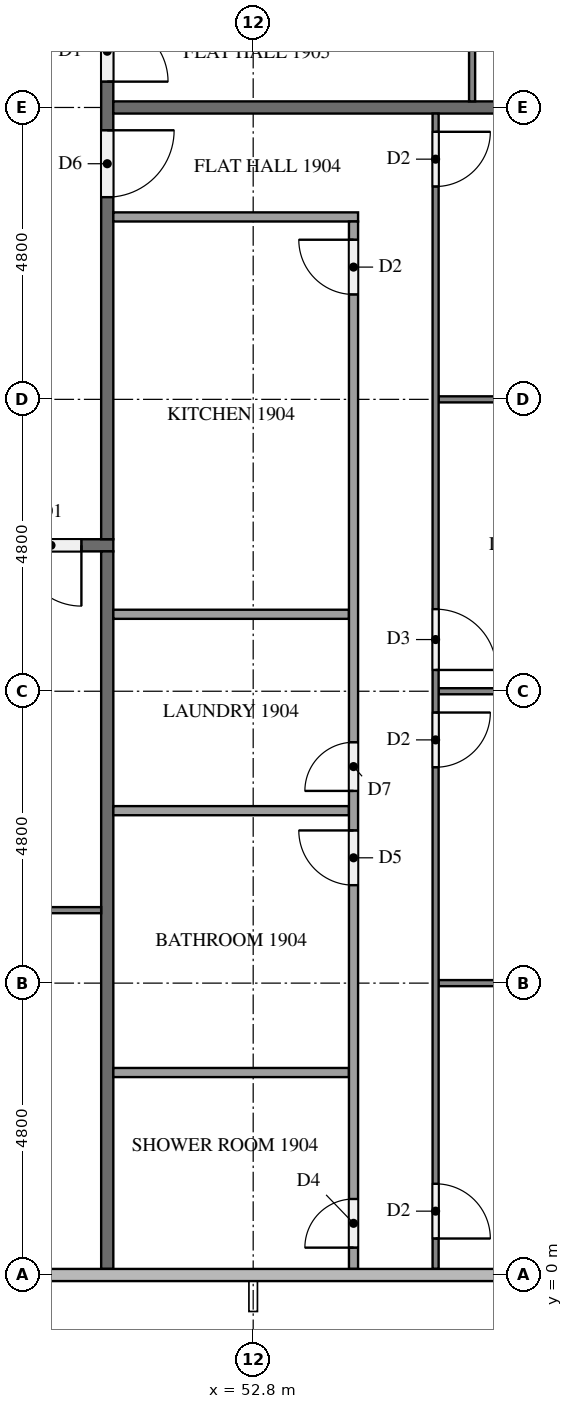
"""IFC4 building model, lengths in metres.
Left out: names, types, materials, properties, quantities, classifications, styles, units other than length and angle.
Written with IfcOpenShell. Run it as: python <this file> out.ifc"""

import sys

from ifc_helpers import new_model, si_unit, direction, frame, frame_2d, origin, place, context, subcontext, project, spatial, rectangle, extrude, element, fill, save


model = new_model("IFC4")
c1 = context("Model", 3, precision=1e-05, world=origin(), true_north=direction((0.0, 1.0)))
c2 = subcontext(c1, "Body", "Model", "MODEL_VIEW")
j1 = project(units=[si_unit("LENGTHUNIT", "METRE"), si_unit("PLANEANGLEUNIT", "RADIAN")], contexts=[c1])
p1 = place(None, origin())
s1 = spatial("IfcSite", under=j1, at=p1, CompositionType="ELEMENT")
p2 = place(p1, origin())
s2 = spatial("IfcBuilding", under=s1, at=p2, CompositionType="ELEMENT")
p3 = place(p2, frame((0.0, 0.0, 76.8)))
s3 = spatial("IfcBuildingStorey", under=s2, at=p3, CompositionType="ELEMENT", Elevation=76.8)
p4 = place(p3, frame((50.5, 12.0, 0.0), z_axis=(0.0, 0.0, 1.0), x_axis=(-1.0, 0.0, 0.0)))
e1 = element("IfcWall", 1, at=p4, inside=s3, PredefinedType="PARTITIONING", context=c2, shape_type="SweptSolid", body=[
    extrude(rectangle(XDim=38.6, YDim=0.2, at=frame_2d((19.3, 0.0))), origin(), (0.0, 0.0, 1.0), 3.2),
])
p5 = place(p4, frame((37.075, 0.0, 0.0)))
e2 = element("IfcOpeningElement", 2, at=p5, cuts=e1, PredefinedType="OPENING", context=c2, shape_type="SweptSolid", body=[
    extrude(rectangle(XDim=1.0, YDim=2.1, at=frame_2d((0.5, 1.05))), frame((0.0, 0.11, 0.0), z_axis=(0.0, -1.0, 0.0), x_axis=(1.0, 0.0, 0.0)), (0.0, 0.0, 1.0), 0.22),
])
p6 = place(p4, frame((22.675, 0.0, 0.0)))
e3 = element("IfcOpeningElement", 3, at=p6, cuts=e1, PredefinedType="OPENING", context=c2, shape_type="SweptSolid", body=[
    extrude(rectangle(XDim=1.0, YDim=2.1, at=frame_2d((0.5, 1.05))), frame((0.0, 0.11, 0.0), z_axis=(0.0, -1.0, 0.0), x_axis=(1.0, 0.0, 0.0)), (0.0, 0.0, 1.0), 0.22),
])
p7 = place(p4, frame((0.525, 0.0, 0.0)))
e4 = element("IfcOpeningElement", 4, at=p7, cuts=e1, PredefinedType="OPENING", context=c2, shape_type="SweptSolid", body=[
    extrude(rectangle(XDim=1.0, YDim=2.1, at=frame_2d((0.5, 1.05))), frame((0.0, 0.11, 0.0), z_axis=(0.0, -1.0, 0.0), x_axis=(1.0, 0.0, 0.0)), (0.0, 0.0, 1.0), 0.22),
])
p8 = place(p3, frame((50.4, 40.7, 0.0), z_axis=(0.0, 0.0, 1.0), x_axis=(0.0, -1.0, 0.0)))
e5 = element("IfcWall", 5, at=p8, inside=s3, PredefinedType="PARTITIONING", context=c2, shape_type="SweptSolid", body=[
    extrude(rectangle(XDim=28.6, YDim=0.2, at=frame_2d((14.3, 0.0))), origin(), (0.0, 0.0, 1.0), 3.2),
])
p9 = place(p8, frame((21.875, 0.0, 0.0)))
e6 = element("IfcOpeningElement", 6, at=p9, cuts=e5, PredefinedType="OPENING", context=c2, shape_type="SweptSolid", body=[
    extrude(rectangle(XDim=1.1, YDim=2.1, at=frame_2d((0.55, 1.05))), frame((0.0, 0.11, 0.0), z_axis=(0.0, -1.0, 0.0), x_axis=(1.0, 0.0, 0.0)), (0.0, 0.0, 1.0), 0.22),
])
p10 = place(p8, frame((20.075, 0.0, 0.0)))
e7 = element("IfcOpeningElement", 7, at=p10, cuts=e5, PredefinedType="OPENING", context=c2, shape_type="SweptSolid", body=[
    extrude(rectangle(XDim=1.0, YDim=2.1, at=frame_2d((0.5, 1.05))), frame((0.0, 0.11, 0.0), z_axis=(0.0, -1.0, 0.0), x_axis=(1.0, 0.0, 0.0)), (0.0, 0.0, 1.0), 0.22),
])
p11 = place(p8, frame((5.675, 0.0, 0.0)))
e8 = element("IfcOpeningElement", 8, at=p11, cuts=e5, PredefinedType="OPENING", context=c2, shape_type="SweptSolid", body=[
    extrude(rectangle(XDim=1.0, YDim=2.1, at=frame_2d((0.5, 1.05))), frame((0.0, 0.11, 0.0), z_axis=(0.0, -1.0, 0.0), x_axis=(1.0, 0.0, 0.0)), (0.0, 0.0, 1.0), 0.22),
])
p12 = place(p3, frame((50.4, 11.9, 0.0), z_axis=(0.0, 0.0, 1.0), x_axis=(0.0, -1.0, 0.0)))
e9 = element("IfcWall", 9, at=p12, inside=s3, PredefinedType="PARTITIONING", context=c2, shape_type="SweptSolid", body=[
    extrude(rectangle(XDim=11.8, YDim=0.2, at=frame_2d((5.9, 0.0))), origin(), (0.0, 0.0, 1.0), 3.2),
])
p13 = place(p3, frame((50.5, 19.2, 0.0), z_axis=(0.0, 0.0, 1.0), x_axis=(1.0, 0.0, 0.0)))
e10 = element("IfcWall", 10, at=p13, inside=s3, PredefinedType="PARTITIONING", context=c2, shape_type="SweptSolid", body=[
    extrude(rectangle(XDim=11.8, YDim=0.2, at=frame_2d((5.9, 0.0))), origin(), (0.0, 0.0, 1.0), 3.2),
])
p14 = place(p3, frame((50.3, 6.0, 0.0), z_axis=(0.0, 0.0, 1.0), x_axis=(-1.0, 0.0, 0.0)))
e11 = element("IfcWall", 11, at=p14, inside=s3, PredefinedType="PARTITIONING", context=c2, shape_type="SweptSolid", body=[
    extrude(rectangle(XDim=11.8, YDim=0.1, at=frame_2d((5.9, 0.0))), origin(), (0.0, 0.0, 1.0), 3.2),
])
p15 = place(p14, frame((5.75, 0.0, 0.0)))
e12 = element("IfcOpeningElement", 12, at=p15, cuts=e11, PredefinedType="OPENING", context=c2, shape_type="SweptSolid", body=[
    extrude(rectangle(XDim=1.0, YDim=2.1, at=frame_2d((0.5, 1.05))), frame((0.0, 0.06, 0.0), z_axis=(0.0, -1.0, 0.0), x_axis=(1.0, 0.0, 0.0)), (0.0, 0.0, 1.0), 0.12),
])
p16 = place(p14, frame((7.45, 0.0, 0.0)))
e13 = element("IfcOpeningElement", 13, at=p16, cuts=e11, PredefinedType="OPENING", context=c2, shape_type="SweptSolid", body=[
    extrude(rectangle(XDim=0.9, YDim=2.1, at=frame_2d((0.45, 1.05))), frame((0.0, 0.06, 0.0), z_axis=(0.0, -1.0, 0.0), x_axis=(1.0, 0.0, 0.0)), (0.0, 0.0, 1.0), 0.12),
])
p17 = place(p3, frame((55.85, 14.4, 0.0), z_axis=(0.0, 0.0, 1.0), x_axis=(1.0, 0.0, 0.0)))
e14 = element("IfcWall", 14, at=p17, inside=s3, PredefinedType="PARTITIONING", context=c2, shape_type="SweptSolid", body=[
    extrude(rectangle(XDim=6.125, YDim=0.1, at=frame_2d((3.062, 0.0))), origin(), (0.0, 0.0, 1.0), 3.2),
])
p18 = place(p3, frame((55.85, 9.6, 0.0), z_axis=(0.0, 0.0, 1.0), x_axis=(1.0, 0.0, 0.0)))
e15 = element("IfcWall", 15, at=p18, inside=s3, PredefinedType="PARTITIONING", context=c2, shape_type="SweptSolid", body=[
    extrude(rectangle(XDim=6.45, YDim=0.1, at=frame_2d((3.225, 0.0))), origin(), (0.0, 0.0, 1.0), 3.2),
])
p19 = place(p3, frame((55.85, 4.8, 0.0), z_axis=(0.0, 0.0, 1.0), x_axis=(1.0, 0.0, 0.0)))
e16 = element("IfcWall", 16, at=p19, inside=s3, PredefinedType="PARTITIONING", context=c2, shape_type="SweptSolid", body=[
    extrude(rectangle(XDim=5.975, YDim=0.1, at=frame_2d((2.987, 0.0))), origin(), (0.0, 0.0, 1.0), 3.2),
])
p20 = place(p3, frame((55.8, 19.1, 0.0), z_axis=(0.0, 0.0, 1.0), x_axis=(0.0, -1.0, 0.0)))
e17 = element("IfcWall", 17, at=p20, inside=s3, PredefinedType="PARTITIONING", context=c2, shape_type="SweptSolid", body=[
    extrude(rectangle(XDim=19.0, YDim=0.1, at=frame_2d((9.5, 0.0))), origin(), (0.0, 0.0, 1.0), 3.2),
])
p21 = place(p20, frame((0.3, 0.0, 0.0)))
e18 = element("IfcOpeningElement", 18, at=p21, cuts=e17, PredefinedType="OPENING", context=c2, shape_type="SweptSolid", body=[
    extrude(rectangle(XDim=0.9, YDim=2.1, at=frame_2d((0.45, 1.05))), frame((0.0, 0.06, 0.0), z_axis=(0.0, -1.0, 0.0), x_axis=(1.0, 0.0, 0.0)), (0.0, 0.0, 1.0), 0.12),
])
p22 = place(p20, frame((8.15, 0.0, 0.0)))
e19 = element("IfcOpeningElement", 19, at=p22, cuts=e17, PredefinedType="OPENING", context=c2, shape_type="SweptSolid", body=[
    extrude(rectangle(XDim=1.0, YDim=2.1, at=frame_2d((0.5, 1.05))), frame((0.0, 0.06, 0.0), z_axis=(0.0, -1.0, 0.0), x_axis=(1.0, 0.0, 0.0)), (0.0, 0.0, 1.0), 0.12),
])
p23 = place(p20, frame((9.85, 0.0, 0.0)))
e20 = element("IfcOpeningElement", 20, at=p23, cuts=e17, PredefinedType="OPENING", context=c2, shape_type="SweptSolid", body=[
    extrude(rectangle(XDim=0.9, YDim=2.1, at=frame_2d((0.45, 1.05))), frame((0.0, 0.06, 0.0), z_axis=(0.0, -1.0, 0.0), x_axis=(1.0, 0.0, 0.0)), (0.0, 0.0, 1.0), 0.12),
])
p24 = place(p20, frame((17.6, 0.0, 0.0)))
e21 = element("IfcOpeningElement", 21, at=p24, cuts=e17, PredefinedType="OPENING", context=c2, shape_type="SweptSolid", body=[
    extrude(rectangle(XDim=0.9, YDim=2.1, at=frame_2d((0.45, 1.05))), frame((0.0, 0.06, 0.0), z_axis=(0.0, -1.0, 0.0), x_axis=(1.0, 0.0, 0.0)), (0.0, 0.0, 1.0), 0.12),
])
for number, where, z_axis, x_axis in (
    (22, (50.5, 10.865, 0.0), (0.0, 0.0, 1.0), (1.0, 0.0, 0.0)),
    (23, (50.5, 7.636, 0.0), (0.0, 0.0, 1.0), (1.0, 0.0, 0.0)),
    (24, (50.5, 3.33, 0.0), (0.0, 0.0, 1.0), (1.0, 0.0, 0.0)),
):
    element("IfcWall", number, at=place(p3, frame(where, z_axis=z_axis, x_axis=x_axis)), inside=s3, PredefinedType="PARTITIONING", context=c2, shape_type="SweptSolid", body=[
        extrude(rectangle(XDim=3.875, YDim=0.15, at=frame_2d((1.938, 0.0))), origin(), (0.0, 0.0, 1.0), 3.2),
    ])
p25 = place(p3, frame((50.5, 17.4, 0.0), z_axis=(0.0, 0.0, 1.0), x_axis=(1.0, 0.0, 0.0)))
e25 = element("IfcWall", 25, at=p25, inside=s3, PredefinedType="PARTITIONING", context=c2, shape_type="SweptSolid", body=[
    extrude(rectangle(XDim=4.025, YDim=0.15, at=frame_2d((2.012, 0.0))), origin(), (0.0, 0.0, 1.0), 3.2),
])
p26 = place(p3, frame((54.45, 0.1, 0.0), z_axis=(0.0, 0.0, 1.0), x_axis=(0.0, 1.0, 0.0)))
e26 = element("IfcWall", 26, at=p26, inside=s3, PredefinedType="PARTITIONING", context=c2, shape_type="SweptSolid", body=[
    extrude(rectangle(XDim=17.225, YDim=0.15, at=frame_2d((8.612, 0.0))), origin(), (0.0, 0.0, 1.0), 3.2),
])
p27 = place(p26, frame((16.025, 0.0, 0.0)))
e27 = element("IfcOpeningElement", 27, at=p27, cuts=e26, PredefinedType="OPENING", context=c2, shape_type="SweptSolid", body=[
    extrude(rectangle(XDim=0.9, YDim=2.1, at=frame_2d((0.45, 1.05))), frame((0.0, 0.085, 0.0), z_axis=(0.0, -1.0, 0.0), x_axis=(1.0, 0.0, 0.0)), (0.0, 0.0, 1.0), 0.17),
])
p28 = place(p26, frame((7.861, 0.0, 0.0)))
e28 = element("IfcOpeningElement", 28, at=p28, cuts=e26, PredefinedType="OPENING", context=c2, shape_type="SweptSolid", body=[
    extrude(rectangle(XDim=0.8, YDim=2.1, at=frame_2d((0.4, 1.05))), frame((0.0, 0.085, 0.0), z_axis=(0.0, -1.0, 0.0), x_axis=(1.0, 0.0, 0.0)), (0.0, 0.0, 1.0), 0.17),
])
p29 = place(p26, frame((6.311, 0.0, 0.0)))
e29 = element("IfcOpeningElement", 29, at=p29, cuts=e26, PredefinedType="OPENING", context=c2, shape_type="SweptSolid", body=[
    extrude(rectangle(XDim=0.9, YDim=2.1, at=frame_2d((0.45, 1.05))), frame((0.0, 0.085, 0.0), z_axis=(0.0, -1.0, 0.0), x_axis=(1.0, 0.0, 0.0)), (0.0, 0.0, 1.0), 0.17),
])
p30 = place(p26, frame((0.35, 0.0, 0.0)))
e30 = element("IfcOpeningElement", 30, at=p30, cuts=e26, PredefinedType="OPENING", context=c2, shape_type="SweptSolid", body=[
    extrude(rectangle(XDim=0.8, YDim=2.1, at=frame_2d((0.4, 1.05))), frame((0.0, 0.085, 0.0), z_axis=(0.0, -1.0, 0.0), x_axis=(1.0, 0.0, 0.0)), (0.0, 0.0, 1.0), 0.17),
])
p31 = place(p3, frame((56.4, 33.5, 0.0), z_axis=(0.0, 0.0, 1.0), x_axis=(0.0, -1.0, 0.0)))
e31 = element("IfcWall", 31, at=p31, inside=s3, PredefinedType="PARTITIONING", context=c2, shape_type="SweptSolid", body=[
    extrude(rectangle(XDim=14.2, YDim=0.1, at=frame_2d((7.1, 0.0))), origin(), (0.0, 0.0, 1.0), 3.2),
])
p32 = place(p31, frame((9.85, 0.0, 0.0)))
e32 = element("IfcOpeningElement", 32, at=p32, cuts=e31, PredefinedType="OPENING", context=c2, shape_type="SweptSolid", body=[
    extrude(rectangle(XDim=0.9, YDim=2.1, at=frame_2d((0.45, 1.05))), frame((0.0, 0.06, 0.0), z_axis=(0.0, -1.0, 0.0), x_axis=(1.0, 0.0, 0.0)), (0.0, 0.0, 1.0), 0.12),
])
p33 = place(p31, frame((8.15, 0.0, 0.0)))
e33 = element("IfcOpeningElement", 33, at=p33, cuts=e31, PredefinedType="OPENING", context=c2, shape_type="SweptSolid", body=[
    extrude(rectangle(XDim=1.0, YDim=2.1, at=frame_2d((0.5, 1.05))), frame((0.0, 0.06, 0.0), z_axis=(0.0, -1.0, 0.0), x_axis=(1.0, 0.0, 0.0)), (0.0, 0.0, 1.0), 0.12),
])
p34 = place(p31, frame((0.3, 0.0, 0.0)))
e34 = element("IfcOpeningElement", 34, at=p34, cuts=e31, PredefinedType="OPENING", context=c2, shape_type="SweptSolid", body=[
    extrude(rectangle(XDim=0.9, YDim=2.1, at=frame_2d((0.45, 1.05))), frame((0.0, 0.06, 0.0), z_axis=(0.0, -1.0, 0.0), x_axis=(1.0, 0.0, 0.0)), (0.0, 0.0, 1.0), 0.12),
])
p35 = place(p7, origin())
e35 = element("IfcDoor", 35, at=p35, inside=s3, OperationType="SINGLE_SWING_LEFT", PredefinedType="DOOR", context=c2, shape_type="SweptSolid", body=[
    extrude(rectangle(XDim=1.0, YDim=2.1, at=frame_2d((0.5, 1.05))), frame((0.0, 0.025, 0.0), z_axis=(0.0, -1.0, 0.0), x_axis=(1.0, 0.0, 0.0)), (0.0, 0.0, 1.0), 0.05),
])
fill(e4, e35)
p36 = place(p9, origin())
e36 = element("IfcDoor", 36, at=p36, inside=s3, OperationType="SINGLE_SWING_LEFT", PredefinedType="DOOR", context=c2, shape_type="SweptSolid", body=[
    extrude(rectangle(XDim=1.1, YDim=2.1, at=frame_2d((0.55, 1.05))), frame((0.0, 0.025, 0.0), z_axis=(0.0, -1.0, 0.0), x_axis=(1.0, 0.0, 0.0)), (0.0, 0.0, 1.0), 0.05),
])
fill(e6, e36)
p37 = place(p10, origin())
e37 = element("IfcDoor", 37, at=p37, inside=s3, OperationType="SINGLE_SWING_RIGHT", PredefinedType="DOOR", context=c2, shape_type="SweptSolid", body=[
    extrude(rectangle(XDim=1.0, YDim=2.1, at=frame_2d((0.5, 1.05))), frame((0.0, 0.025, 0.0), z_axis=(0.0, -1.0, 0.0), x_axis=(1.0, 0.0, 0.0)), (0.0, 0.0, 1.0), 0.05),
])
fill(e7, e37)
p38 = place(p21, origin())
e38 = element("IfcDoor", 38, at=p38, inside=s3, OperationType="SINGLE_SWING_LEFT", PredefinedType="DOOR", context=c2, shape_type="SweptSolid", body=[
    extrude(rectangle(XDim=0.9, YDim=2.1, at=frame_2d((0.45, 1.05))), frame((0.0, 0.025, 0.0), z_axis=(0.0, -1.0, 0.0), x_axis=(1.0, 0.0, 0.0)), (0.0, 0.0, 1.0), 0.05),
])
fill(e18, e38)
p39 = place(p22, origin())
e39 = element("IfcDoor", 39, at=p39, inside=s3, OperationType="SINGLE_SWING_RIGHT", PredefinedType="DOOR", context=c2, shape_type="SweptSolid", body=[
    extrude(rectangle(XDim=1.0, YDim=2.1, at=frame_2d((0.5, 1.05))), frame((0.0, 0.025, 0.0), z_axis=(0.0, -1.0, 0.0), x_axis=(1.0, 0.0, 0.0)), (0.0, 0.0, 1.0), 0.05),
])
fill(e19, e39)
p40 = place(p23, origin())
e40 = element("IfcDoor", 40, at=p40, inside=s3, OperationType="SINGLE_SWING_LEFT", PredefinedType="DOOR", context=c2, shape_type="SweptSolid", body=[
    extrude(rectangle(XDim=0.9, YDim=2.1, at=frame_2d((0.45, 1.05))), frame((0.0, 0.025, 0.0), z_axis=(0.0, -1.0, 0.0), x_axis=(1.0, 0.0, 0.0)), (0.0, 0.0, 1.0), 0.05),
])
fill(e20, e40)
p41 = place(p24, origin())
e41 = element("IfcDoor", 41, at=p41, inside=s3, OperationType="SINGLE_SWING_RIGHT", PredefinedType="DOOR", context=c2, shape_type="SweptSolid", body=[
    extrude(rectangle(XDim=0.9, YDim=2.1, at=frame_2d((0.45, 1.05))), frame((0.0, 0.025, 0.0), z_axis=(0.0, -1.0, 0.0), x_axis=(1.0, 0.0, 0.0)), (0.0, 0.0, 1.0), 0.05),
])
fill(e21, e41)
p42 = place(p27, origin())
e42 = element("IfcDoor", 42, at=p42, inside=s3, OperationType="SINGLE_SWING_RIGHT", PredefinedType="DOOR", context=c2, shape_type="SweptSolid", body=[
    extrude(rectangle(XDim=0.9, YDim=2.1, at=frame_2d((0.45, 1.05))), frame((0.0, 0.025, 0.0), z_axis=(0.0, -1.0, 0.0), x_axis=(1.0, 0.0, 0.0)), (0.0, 0.0, 1.0), 0.05),
])
fill(e27, e42)
p43 = place(p28, origin())
e43 = element("IfcDoor", 43, at=p43, inside=s3, OperationType="SINGLE_SWING_LEFT", PredefinedType="DOOR", context=c2, shape_type="SweptSolid", body=[
    extrude(rectangle(XDim=0.8, YDim=2.1, at=frame_2d((0.4, 1.05))), frame((0.0, 0.025, 0.0), z_axis=(0.0, -1.0, 0.0), x_axis=(1.0, 0.0, 0.0)), (0.0, 0.0, 1.0), 0.05),
])
fill(e28, e43)
p44 = place(p29, origin())
e44 = element("IfcDoor", 44, at=p44, inside=s3, OperationType="SINGLE_SWING_RIGHT", PredefinedType="DOOR", context=c2, shape_type="SweptSolid", body=[
    extrude(rectangle(XDim=0.9, YDim=2.1, at=frame_2d((0.45, 1.05))), frame((0.0, 0.025, 0.0), z_axis=(0.0, -1.0, 0.0), x_axis=(1.0, 0.0, 0.0)), (0.0, 0.0, 1.0), 0.05),
])
fill(e29, e44)
p45 = place(p30, origin())
e45 = element("IfcDoor", 45, at=p45, inside=s3, OperationType="SINGLE_SWING_LEFT", PredefinedType="DOOR", context=c2, shape_type="SweptSolid", body=[
    extrude(rectangle(XDim=0.8, YDim=2.1, at=frame_2d((0.4, 1.05))), frame((0.0, 0.025, 0.0), z_axis=(0.0, -1.0, 0.0), x_axis=(1.0, 0.0, 0.0)), (0.0, 0.0, 1.0), 0.05),
])
fill(e30, e45)
save(model, sys.argv[1])
